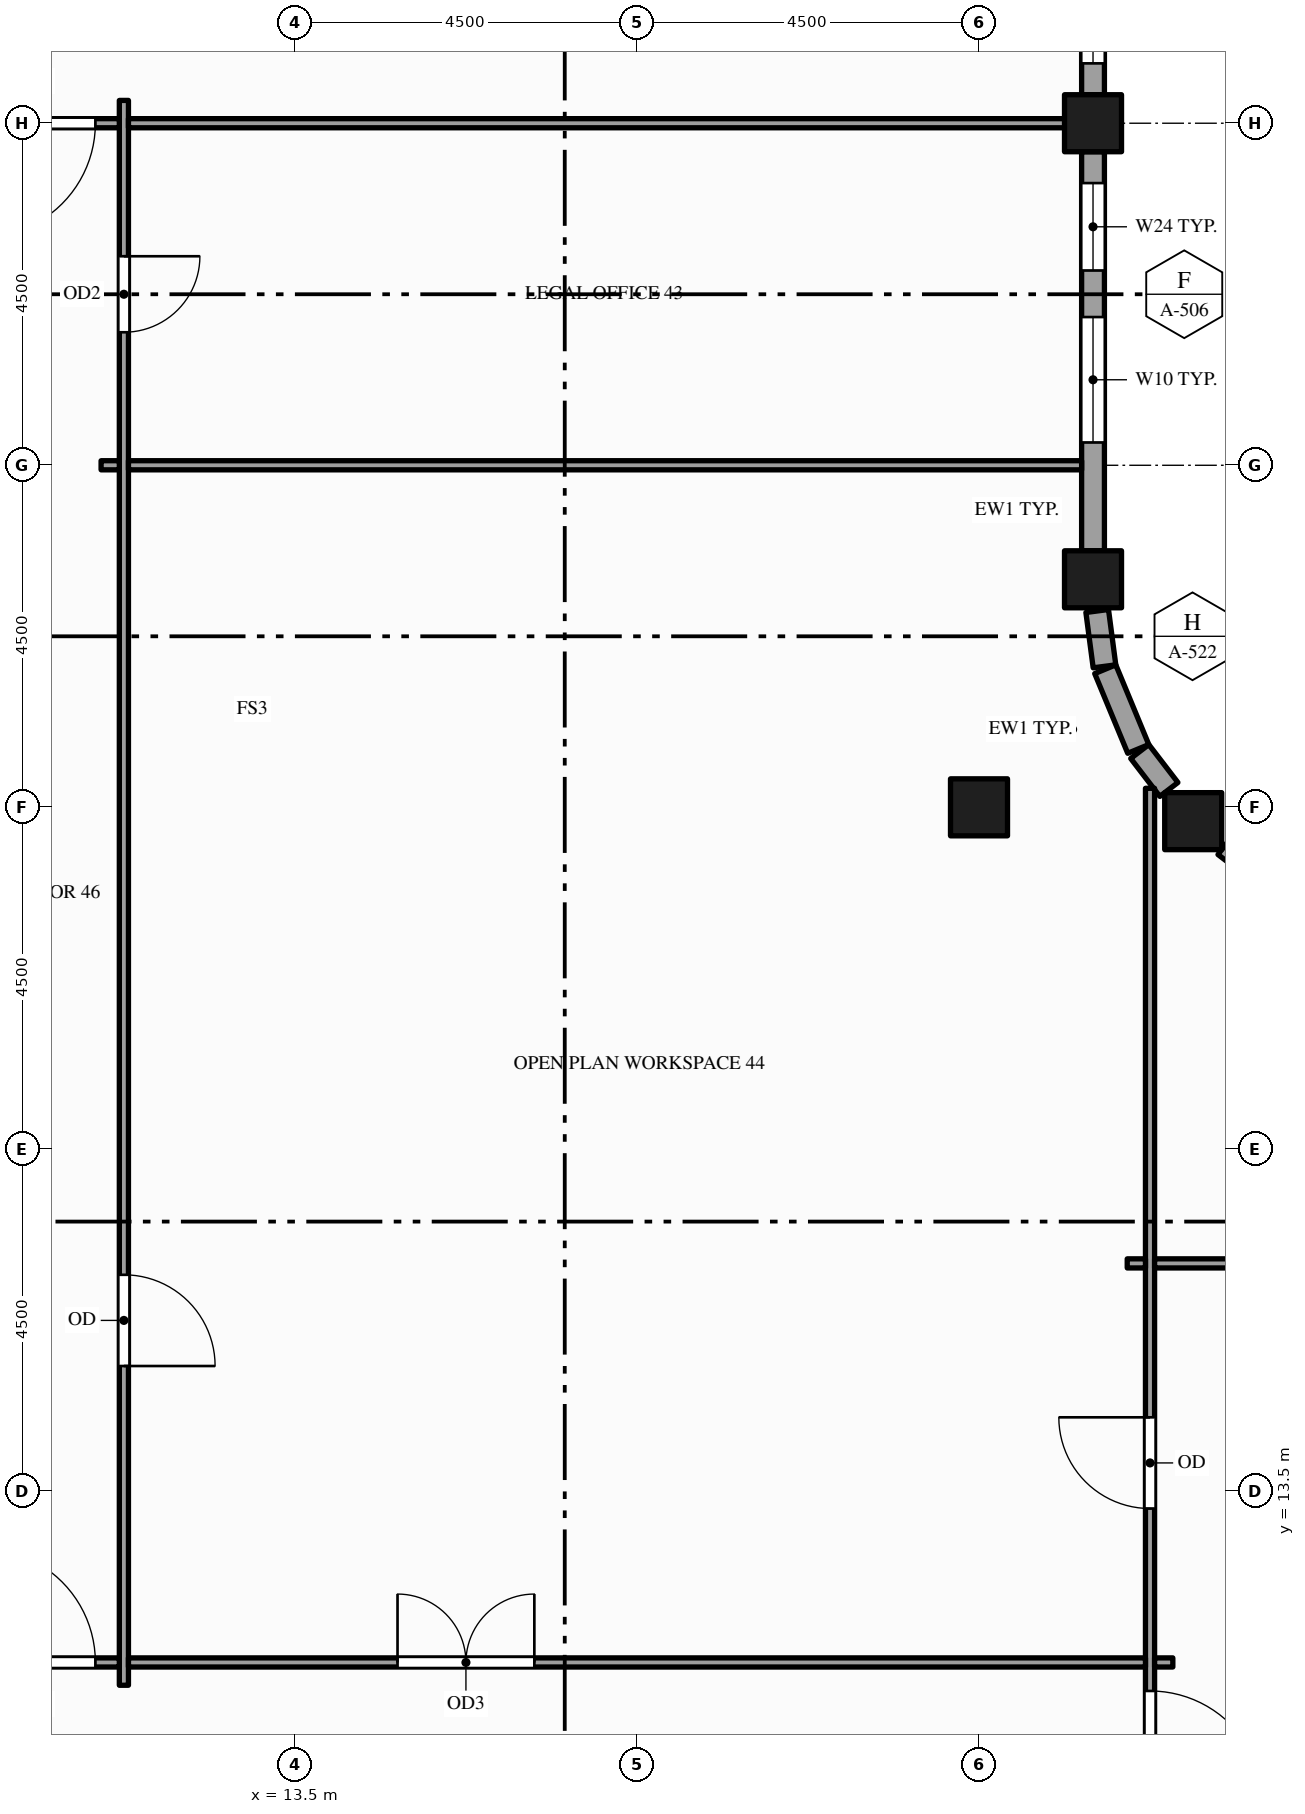
"""IFC4 building model, lengths in metres.
Left out: names, types, materials, properties, quantities, classifications, styles, units other than length and angle.
Written with IfcOpenShell. Run it as: python <this file> out.ifc"""

import sys

from ifc_helpers import new_model, si_unit, direction, frame, frame_2d, origin, origin_2d, place, context, subcontext, project, spatial, rectangle, hollow_rectangle, extrude, element, fill, save


model = new_model("IFC4")
c1 = context("Model", 3, precision=1e-05, world=origin(), true_north=direction((0.0, 1.0)))
c2 = subcontext(c1, "Body", "Model", "MODEL_VIEW")
j1 = project(units=[si_unit("LENGTHUNIT", "METRE"), si_unit("PLANEANGLEUNIT", "RADIAN")], contexts=[c1])
p1 = place(None, origin())
s1 = spatial("IfcSite", under=j1, at=p1, CompositionType="ELEMENT")
p2 = place(p1, origin())
s2 = spatial("IfcBuilding", under=s1, at=p2, CompositionType="ELEMENT")
p3 = place(p2, frame((0.0, 0.0, 199.0)))
s3 = spatial("IfcBuildingStorey", under=s2, at=p3, CompositionType="ELEMENT", Elevation=199.0)
for number, where, z_axis, x_axis in (
    (1, (22.5, 22.5, -0.15), (0.0, 0.0, 1.0), (1.0, 0.0, 0.0)),
    (2, (24.0, 25.5, -0.15), (0.0, 0.0, 1.0), (1.0, 0.0, 0.0)),
    (3, (24.0, 31.5, -0.15), (0.0, 0.0, 1.0), (1.0, 0.0, 0.0)),
    (4, (25.318, 22.318, -0.15), (0.0, 0.0, 1.0), (1.0, 0.0, 0.0)),
):
    element("IfcColumn", number, at=place(p3, frame(where, z_axis=z_axis, x_axis=x_axis)), inside=s3, PredefinedType="COLUMN", context=c2, shape_type="SweptSolid", body=[
        extrude(hollow_rectangle(XDim=0.75, YDim=0.75, WallThickness=0.036, at=origin_2d()), origin(), (0.0, 0.0, 1.0), 4.0),
    ])
p4 = place(p3, frame((26.234, 21.615, 0.0), z_axis=(0.0, 0.0, 1.0), x_axis=(-0.793575131083, 0.608472276547, 0.0)))
e5 = element("IfcWall", 5, at=p4, inside=s3, PredefinedType="STANDARD", context=c2, shape_type="SweptSolid", body=[
    extrude(rectangle(XDim=0.629, YDim=0.3, at=frame_2d((0.314, 0.0))), origin(), (0.0, 0.0, 1.0), 3.157),
])
p5 = place(p3, frame((24.998, 22.735, 0.0), z_axis=(0.0, 0.0, 1.0), x_axis=(-0.608472276547, 0.793575131083, 0.0)))
e6 = element("IfcWall", 6, at=p5, inside=s3, PredefinedType="STANDARD", context=c2, shape_type="SweptSolid", body=[
    extrude(rectangle(XDim=0.629, YDim=0.3, at=frame_2d((0.314, 0.0))), origin(), (0.0, 0.0, 1.0), 2.76),
])
p6 = place(p3, frame((24.595, 23.268, 0.0), z_axis=(0.0, 0.0, 1.0), x_axis=(-0.382598720491, 0.923914616768, 0.0)))
e7 = element("IfcWall", 7, at=p6, inside=s3, PredefinedType="STANDARD", context=c2, shape_type="SweptSolid", body=[
    extrude(rectangle(XDim=1.135, YDim=0.3, at=frame_2d((0.568, 0.0))), origin(), (0.0, 0.0, 1.0), 2.76),
])
p7 = place(p3, frame((24.151, 24.355, 0.0), z_axis=(0.0, 0.0, 1.0), x_axis=(-0.130660917588, 0.99142711513, 0.0)))
e8 = element("IfcWall", 8, at=p7, inside=s3, PredefinedType="STANDARD", context=c2, shape_type="SweptSolid", body=[
    extrude(rectangle(XDim=0.734, YDim=0.3, at=frame_2d((0.367, 0.0))), origin(), (0.0, 0.0, 1.0), 3.157),
])
p8 = place(p3, frame((24.0, 25.875, 0.0), z_axis=(0.0, 0.0, 1.0), x_axis=(0.0, 1.0, 0.0)))
e9 = element("IfcWall", 9, at=p8, inside=s3, PredefinedType="STANDARD", context=c2, shape_type="SweptSolid", body=[
    extrude(rectangle(XDim=5.25, YDim=0.3, at=frame_2d((2.625, 0.0))), origin(), (0.0, 0.0, 1.0), 3.157),
])
p9 = place(p8, frame((1.425, 0.0, 0.9)))
e10 = element("IfcOpeningElement", 10, at=p9, cuts=e9, PredefinedType="OPENING", context=c2, shape_type="SweptSolid", body=[
    extrude(rectangle(XDim=1.65, YDim=2.0, at=frame_2d((0.825, 1.0))), frame((0.0, 0.16, 0.0), z_axis=(0.0, -1.0, 0.0), x_axis=(1.0, 0.0, 0.0)), (0.0, 0.0, 1.0), 0.32),
])
p10 = place(p8, frame((3.688, 0.0, 0.9)))
e11 = element("IfcOpeningElement", 11, at=p10, cuts=e9, PredefinedType="OPENING", context=c2, shape_type="SweptSolid", body=[
    extrude(rectangle(XDim=1.15, YDim=2.0, at=frame_2d((0.575, 1.0))), frame((0.0, 0.16, 0.0), z_axis=(0.0, -1.0, 0.0), x_axis=(1.0, 0.0, 0.0)), (0.0, 0.0, 1.0), 0.32),
])
p11 = place(p3, frame((24.0, 31.875, 0.0), z_axis=(0.0, 0.0, 1.0), x_axis=(0.0, 1.0, 0.0)))
e12 = element("IfcWall", 12, at=p11, inside=s3, PredefinedType="STANDARD", context=c2, shape_type="SweptSolid", body=[
    extrude(rectangle(XDim=3.75, YDim=0.3, at=frame_2d((1.875, 0.0))), origin(), (0.0, 0.0, 1.0), 3.157),
])
p12 = place(p11, frame((0.413, 0.0, 0.9)))
e13 = element("IfcOpeningElement", 13, at=p12, cuts=e12, PredefinedType="OPENING", context=c2, shape_type="SweptSolid", body=[
    extrude(rectangle(XDim=1.15, YDim=2.0, at=frame_2d((0.575, 1.0))), frame((0.0, 0.16, 0.0), z_axis=(0.0, -1.0, 0.0), x_axis=(1.0, 0.0, 0.0)), (0.0, 0.0, 1.0), 0.32),
])
p13 = place(p11, frame((2.188, 0.0, 0.9)))
e14 = element("IfcOpeningElement", 14, at=p13, cuts=e12, PredefinedType="OPENING", context=c2, shape_type="SweptSolid", body=[
    extrude(rectangle(XDim=1.15, YDim=2.0, at=frame_2d((0.575, 1.0))), frame((0.0, 0.16, 0.0), z_axis=(0.0, -1.0, 0.0), x_axis=(1.0, 0.0, 0.0)), (0.0, 0.0, 1.0), 0.32),
])
p14 = place(p3, frame((11.25, 10.95, 0.0), z_axis=(0.0, 0.0, 1.0), x_axis=(0.0, 1.0, 0.0)))
e15 = element("IfcWall", 15, at=p14, inside=s3, PredefinedType="PARTITIONING", context=c2, shape_type="SweptSolid", body=[
    extrude(rectangle(XDim=20.85, YDim=0.12, at=frame_2d((10.425, 0.0))), origin(), (0.0, 0.0, 1.0), 2.6),
])
p15 = place(p14, frame((17.8, 0.0, 0.0)))
e16 = element("IfcOpeningElement", 16, at=p15, cuts=e15, PredefinedType="OPENING", context=c2, shape_type="SweptSolid", body=[
    extrude(rectangle(XDim=1.0, YDim=2.1, at=frame_2d((0.5, 1.05))), frame((0.0, 0.07, 0.0), z_axis=(0.0, -1.0, 0.0), x_axis=(1.0, 0.0, 0.0)), (0.0, 0.0, 1.0), 0.14),
])
p16 = place(p14, frame((4.2, 0.0, 0.0)))
e17 = element("IfcOpeningElement", 17, at=p16, cuts=e15, PredefinedType="OPENING", context=c2, shape_type="SweptSolid", body=[
    extrude(rectangle(XDim=1.2, YDim=2.1, at=frame_2d((0.6, 1.05))), frame((0.0, 0.07, 0.0), z_axis=(0.0, -1.0, 0.0), x_axis=(1.0, 0.0, 0.0)), (0.0, 0.0, 1.0), 0.14),
])
p17 = place(p3, frame((24.75, -1.35, 0.0), z_axis=(0.0, 0.0, 1.0), x_axis=(0.0, 1.0, 0.0)))
e18 = element("IfcWall", 18, at=p17, inside=s3, PredefinedType="PARTITIONING", context=c2, shape_type="SweptSolid", body=[
    extrude(rectangle(XDim=24.101, YDim=0.12, at=frame_2d((12.05, 0.0))), origin(), (0.0, 0.0, 1.0), 2.76),
])
p18 = place(p17, frame((10.725, 0.0, 0.0)))
e19 = element("IfcOpeningElement", 19, at=p18, cuts=e18, PredefinedType="OPENING", context=c2, shape_type="SweptSolid", body=[
    extrude(rectangle(XDim=1.5, YDim=2.1, at=frame_2d((0.75, 1.05))), frame((0.0, 0.07, 0.0), z_axis=(0.0, -1.0, 0.0), x_axis=(1.0, 0.0, 0.0)), (0.0, 0.0, 1.0), 0.14),
])
p19 = place(p17, frame((14.625, 0.0, 0.0)))
e20 = element("IfcOpeningElement", 20, at=p19, cuts=e18, PredefinedType="OPENING", context=c2, shape_type="SweptSolid", body=[
    extrude(rectangle(XDim=1.2, YDim=2.1, at=frame_2d((0.6, 1.05))), frame((0.0, 0.07, 0.0), z_axis=(0.0, -1.0, 0.0), x_axis=(1.0, 0.0, 0.0)), (0.0, 0.0, 1.0), 0.14),
])
p20 = place(p3, frame((9.06, 11.25, 0.0), z_axis=(0.0, 0.0, 1.0), x_axis=(1.0, 0.0, 0.0)))
e21 = element("IfcWall", 21, at=p20, inside=s3, PredefinedType="PARTITIONING", context=c2, shape_type="SweptSolid", body=[
    extrude(rectangle(XDim=2.13, YDim=0.12, at=frame_2d((1.065, 0.0))), origin(), (0.0, 0.0, 1.0), 2.87),
])
p21 = place(p20, frame((0.315, 0.0, 0.0)))
e22 = element("IfcOpeningElement", 22, at=p21, cuts=e21, PredefinedType="OPENING", context=c2, shape_type="SweptSolid", body=[
    extrude(rectangle(XDim=1.5, YDim=2.1, at=frame_2d((0.75, 1.05))), frame((0.0, 0.07, 0.0), z_axis=(0.0, -1.0, 0.0), x_axis=(1.0, 0.0, 0.0)), (0.0, 0.0, 1.0), 0.14),
])
p22 = place(p3, frame((11.31, 11.25, 0.0), z_axis=(0.0, 0.0, 1.0), x_axis=(1.0, 0.0, 0.0)))
e23 = element("IfcWall", 23, at=p22, inside=s3, PredefinedType="PARTITIONING", context=c2, shape_type="SweptSolid", body=[
    extrude(rectangle(XDim=13.38, YDim=0.12, at=frame_2d((6.69, 0.0))), origin(), (0.0, 0.0, 1.0), 2.76),
])
p23 = place(p22, frame((3.54, 0.0, 0.0)))
e24 = element("IfcOpeningElement", 24, at=p23, cuts=e23, PredefinedType="OPENING", context=c2, shape_type="SweptSolid", body=[
    extrude(rectangle(XDim=1.8, YDim=2.1, at=frame_2d((0.9, 1.05))), frame((0.0, 0.07, 0.0), z_axis=(0.0, -1.0, 0.0), x_axis=(1.0, 0.0, 0.0)), (0.0, 0.0, 1.0), 0.14),
])
for number, where, z_axis, x_axis in (
    (25, (24.81, 11.25, 0.0), (0.0, 0.0, 1.0), (1.0, 0.0, 0.0)),
    (26, (24.45, 16.5, 0.0), (0.0, 0.0, 1.0), (1.0, 0.0, 0.0)),
):
    element("IfcWall", number, at=place(p3, frame(where, z_axis=z_axis, x_axis=x_axis)), inside=s3, PredefinedType="PARTITIONING", context=c2, shape_type="SweptSolid", body=[
        extrude(rectangle(XDim=0.24, YDim=0.12, at=frame_2d((0.12, 0.0))), origin(), (0.0, 0.0, 1.0), 2.76),
    ])
p24 = place(p3, frame((24.81, 16.5, 0.0), z_axis=(0.0, 0.0, 1.0), x_axis=(1.0, 0.0, 0.0)))
e27 = element("IfcWall", 27, at=p24, inside=s3, PredefinedType="PARTITIONING", context=c2, shape_type="SweptSolid", body=[
    extrude(rectangle(XDim=2.13, YDim=0.12, at=frame_2d((1.065, 0.0))), origin(), (0.0, 0.0, 1.0), 2.76),
])
p25 = place(p3, frame((10.95, 27.0, 0.0), z_axis=(0.0, 0.0, 1.0), x_axis=(1.0, 0.0, 0.0)))
e28 = element("IfcWall", 28, at=p25, inside=s3, PredefinedType="PARTITIONING", context=c2, shape_type="SweptSolid", body=[
    extrude(rectangle(XDim=0.24, YDim=0.12, at=frame_2d((0.12, 0.0))), origin(), (0.0, 0.0, 1.0), 2.87),
])
p26 = place(p3, frame((11.31, 27.0, 0.0), z_axis=(0.0, 0.0, 1.0), x_axis=(1.0, 0.0, 0.0)))
e29 = element("IfcWall", 29, at=p26, inside=s3, PredefinedType="PARTITIONING", context=c2, shape_type="SweptSolid", body=[
    extrude(rectangle(XDim=12.54, YDim=0.12, at=frame_2d((6.27, 0.0))), origin(), (0.0, 0.0, 1.0), 2.87),
])
p27 = place(p3, frame((9.06, 31.5, 0.0), z_axis=(0.0, 0.0, 1.0), x_axis=(1.0, 0.0, 0.0)))
e30 = element("IfcWall", 30, at=p27, inside=s3, PredefinedType="PARTITIONING", context=c2, shape_type="SweptSolid", body=[
    extrude(rectangle(XDim=2.13, YDim=0.12, at=frame_2d((1.065, 0.0))), origin(), (0.0, 0.0, 1.0), 2.87),
])
p28 = place(p27, frame((0.315, 0.0, 0.0)))
e31 = element("IfcOpeningElement", 31, at=p28, cuts=e30, PredefinedType="OPENING", context=c2, shape_type="SweptSolid", body=[
    extrude(rectangle(XDim=1.5, YDim=2.1, at=frame_2d((0.75, 1.05))), frame((0.0, 0.07, 0.0), z_axis=(0.0, -1.0, 0.0), x_axis=(1.0, 0.0, 0.0)), (0.0, 0.0, 1.0), 0.14),
])
p29 = place(p3, frame((11.31, 31.5, 0.0), z_axis=(0.0, 0.0, 1.0), x_axis=(1.0, 0.0, 0.0)))
e32 = element("IfcWall", 32, at=p29, inside=s3, PredefinedType="PARTITIONING", context=c2, shape_type="SweptSolid", body=[
    extrude(rectangle(XDim=12.54, YDim=0.12, at=frame_2d((6.27, 0.0))), origin(), (0.0, 0.0, 1.0), 2.87),
])
p30 = place(p9, origin())
e33 = element("IfcWindow", 33, at=p30, inside=s3, PartitioningType="SINGLE_PANEL", PredefinedType="WINDOW", context=c2, shape_type="SweptSolid", body=[
    extrude(rectangle(XDim=1.65, YDim=2.0, at=frame_2d((0.825, 1.0))), frame((0.0, 0.03, 0.0), z_axis=(0.0, -1.0, 0.0), x_axis=(1.0, 0.0, 0.0)), (0.0, 0.0, 1.0), 0.06),
])
fill(e10, e33)
p31 = place(p10, origin())
e34 = element("IfcWindow", 34, at=p31, inside=s3, PartitioningType="SINGLE_PANEL", PredefinedType="WINDOW", context=c2, shape_type="SweptSolid", body=[
    extrude(rectangle(XDim=1.15, YDim=2.0, at=frame_2d((0.575, 1.0))), frame((0.0, 0.03, 0.0), z_axis=(0.0, -1.0, 0.0), x_axis=(1.0, 0.0, 0.0)), (0.0, 0.0, 1.0), 0.06),
])
fill(e11, e34)
p32 = place(p12, origin())
e35 = element("IfcWindow", 35, at=p32, inside=s3, PartitioningType="SINGLE_PANEL", PredefinedType="WINDOW", context=c2, shape_type="SweptSolid", body=[
    extrude(rectangle(XDim=1.15, YDim=2.0, at=frame_2d((0.575, 1.0))), frame((0.0, 0.03, 0.0), z_axis=(0.0, -1.0, 0.0), x_axis=(1.0, 0.0, 0.0)), (0.0, 0.0, 1.0), 0.06),
])
fill(e13, e35)
p33 = place(p18, origin())
e36 = element("IfcDoor", 36, at=p33, inside=s3, OperationType="SINGLE_SWING_LEFT", PredefinedType="DOOR", context=c2, shape_type="SweptSolid", body=[
    extrude(rectangle(XDim=1.5, YDim=2.1, at=frame_2d((0.75, 1.05))), frame((0.0, 0.025, 0.0), z_axis=(0.0, -1.0, 0.0), x_axis=(1.0, 0.0, 0.0)), (0.0, 0.0, 1.0), 0.05),
])
fill(e19, e36)
p34 = place(p23, origin())
e37 = element("IfcDoor", 37, at=p34, inside=s3, OperationType="DOUBLE_DOOR_SINGLE_SWING", PredefinedType="DOOR", context=c2, shape_type="SweptSolid", body=[
    extrude(rectangle(XDim=1.8, YDim=2.1, at=frame_2d((0.9, 1.05))), frame((0.0, 0.025, 0.0), z_axis=(0.0, -1.0, 0.0), x_axis=(1.0, 0.0, 0.0)), (0.0, 0.0, 1.0), 0.05),
])
fill(e24, e37)
p35 = place(p21, origin())
e38 = element("IfcDoor", 38, at=p35, inside=s3, OperationType="SINGLE_SWING_LEFT", PredefinedType="DOOR", context=c2, shape_type="SweptSolid", body=[
    extrude(rectangle(XDim=1.5, YDim=2.1, at=frame_2d((0.75, 1.05))), frame((0.0, 0.025, 0.0), z_axis=(0.0, -1.0, 0.0), x_axis=(1.0, 0.0, 0.0)), (0.0, 0.0, 1.0), 0.05),
])
fill(e22, e38)
p36 = place(p28, origin())
e39 = element("IfcDoor", 39, at=p36, inside=s3, OperationType="SINGLE_SWING_LEFT", PredefinedType="DOOR", context=c2, shape_type="SweptSolid", body=[
    extrude(rectangle(XDim=1.5, YDim=2.1, at=frame_2d((0.75, 1.05))), frame((0.0, 0.025, 0.0), z_axis=(0.0, -1.0, 0.0), x_axis=(1.0, 0.0, 0.0)), (0.0, 0.0, 1.0), 0.05),
])
fill(e31, e39)
p37 = place(p15, origin())
e40 = element("IfcDoor", 40, at=p37, inside=s3, OperationType="SINGLE_SWING_RIGHT", PredefinedType="DOOR", context=c2, shape_type="SweptSolid", body=[
    extrude(rectangle(XDim=1.0, YDim=2.1, at=frame_2d((0.5, 1.05))), frame((0.0, 0.025, 0.0), z_axis=(0.0, -1.0, 0.0), x_axis=(1.0, 0.0, 0.0)), (0.0, 0.0, 1.0), 0.05),
])
fill(e16, e40)
p38 = place(p16, origin())
e41 = element("IfcDoor", 41, at=p38, inside=s3, OperationType="SINGLE_SWING_LEFT", PredefinedType="DOOR", context=c2, shape_type="SweptSolid", body=[
    extrude(rectangle(XDim=1.2, YDim=2.1, at=frame_2d((0.6, 1.05))), frame((0.0, 0.025, 0.0), z_axis=(0.0, -1.0, 0.0), x_axis=(1.0, 0.0, 0.0)), (0.0, 0.0, 1.0), 0.05),
])
fill(e17, e41)
p39 = place(p19, origin())
e42 = element("IfcDoor", 42, at=p39, inside=s3, OperationType="SINGLE_SWING_RIGHT", PredefinedType="DOOR", context=c2, shape_type="SweptSolid", body=[
    extrude(rectangle(XDim=1.2, YDim=2.1, at=frame_2d((0.6, 1.05))), frame((0.0, 0.025, 0.0), z_axis=(0.0, -1.0, 0.0), x_axis=(1.0, 0.0, 0.0)), (0.0, 0.0, 1.0), 0.05),
])
fill(e20, e42)
save(model, sys.argv[1])
